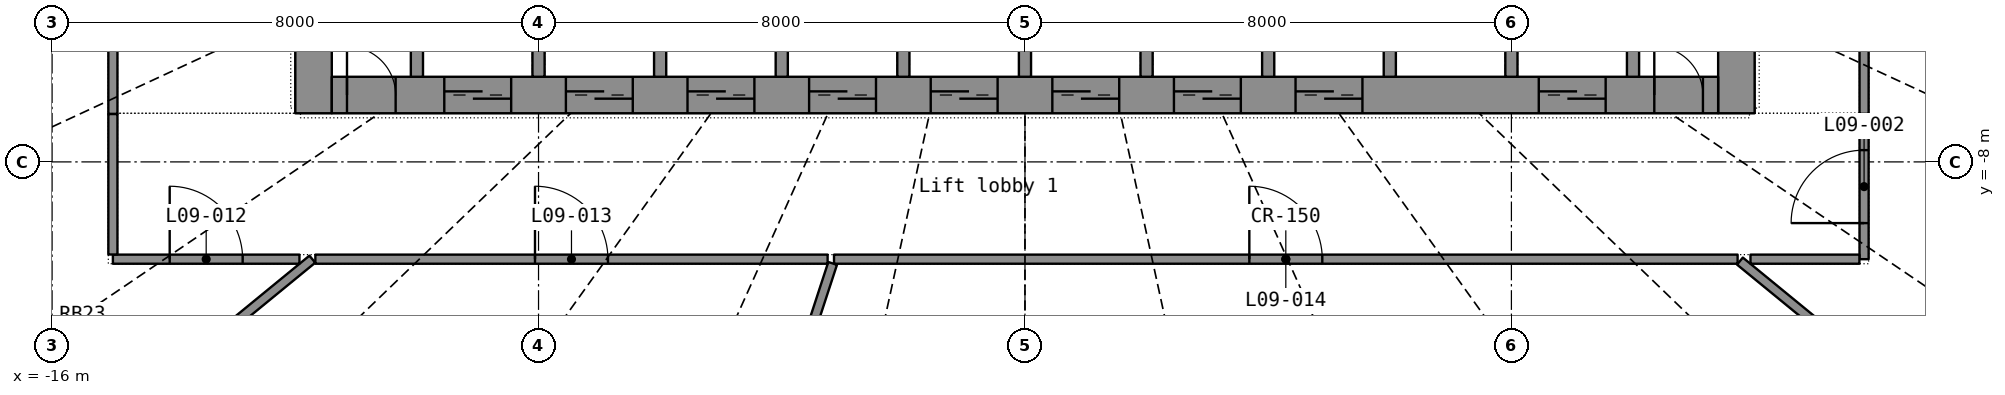
"""IFC4 building model, lengths in metres.
Left out: names, types, materials, properties, quantities, classifications, styles, units other than length and angle.
Written with IfcOpenShell. Run it as: python <this file> out.ifc"""

import sys

from ifc_helpers import new_model, si_unit, direction, frame, frame_2d, origin, place, context, subcontext, project, spatial, rectangle, extrude, element, fill, save


model = new_model("IFC4")
c1 = context("Model", 3, precision=1e-05, world=origin(), true_north=direction((0.0, 1.0)))
c2 = subcontext(c1, "Body", "Model", "MODEL_VIEW")
j1 = project(units=[si_unit("LENGTHUNIT", "METRE"), si_unit("PLANEANGLEUNIT", "RADIAN")], contexts=[c1])
p1 = place(None, origin())
s1 = spatial("IfcSite", under=j1, at=p1, CompositionType="ELEMENT")
p2 = place(p1, origin())
s2 = spatial("IfcBuilding", under=s1, at=p2, CompositionType="ELEMENT")
p3 = place(p2, frame((0.0, 0.0, 44.5)))
s3 = spatial("IfcBuildingStorey", under=s2, at=p3, CompositionType="ELEMENT", Elevation=44.5)
p4 = place(p3, frame((-11.7, -7.2, 0.0), z_axis=(0.0, 0.0, 1.0), x_axis=(0.0, 1.0, 0.0)))
e1 = element("IfcWall", 1, at=p4, inside=s3, PredefinedType="SHEAR", context=c2, shape_type="SweptSolid", body=[
    extrude(rectangle(XDim=14.4, YDim=0.6, at=frame_2d((7.2, 0.0))), origin(), (0.0, 0.0, 1.0), 3.3),
])
p5 = place(p4, frame((6.5, 0.0, 0.0)))
e2 = element("IfcOpeningElement", 2, at=p5, cuts=e1, PredefinedType="OPENING", context=c2, shape_type="SweptSolid", body=[
    extrude(rectangle(XDim=1.4, YDim=2.2, at=frame_2d((0.7, 1.1))), frame((0.0, 0.31, 0.0), z_axis=(0.0, -1.0, 0.0), x_axis=(1.0, 0.0, 0.0)), (0.0, 0.0, 1.0), 0.62),
])
p6 = place(p3, frame((11.7, -7.2, 0.0), z_axis=(0.0, 0.0, 1.0), x_axis=(0.0, 1.0, 0.0)))
e3 = element("IfcWall", 3, at=p6, inside=s3, PredefinedType="SHEAR", context=c2, shape_type="SweptSolid", body=[
    extrude(rectangle(XDim=14.4, YDim=0.6, at=frame_2d((7.2, 0.0))), origin(), (0.0, 0.0, 1.0), 3.3),
])
p7 = place(p6, frame((6.5, 0.0, 0.0)))
e4 = element("IfcOpeningElement", 4, at=p7, cuts=e3, PredefinedType="OPENING", context=c2, shape_type="SweptSolid", body=[
    extrude(rectangle(XDim=1.4, YDim=2.2, at=frame_2d((0.7, 1.1))), frame((0.0, 0.31, 0.0), z_axis=(0.0, -1.0, 0.0), x_axis=(1.0, 0.0, 0.0)), (0.0, 0.0, 1.0), 0.62),
])
p8 = place(p3, frame((-11.4, -6.9, 0.0), z_axis=(0.0, 0.0, 1.0), x_axis=(1.0, 0.0, 0.0)))
e5 = element("IfcWall", 5, at=p8, inside=s3, PredefinedType="SHEAR", context=c2, shape_type="SweptSolid", body=[
    extrude(rectangle(XDim=22.8, YDim=0.6, at=frame_2d((11.4, 0.0))), origin(), (0.0, 0.0, 1.0), 3.3),
])
p9 = place(p8, frame((1.85, 0.0, 0.0)))
e6 = element("IfcOpeningElement", 6, at=p9, cuts=e5, PredefinedType="OPENING", context=c2, shape_type="SweptSolid", body=[
    extrude(rectangle(XDim=1.1, YDim=2.2, at=frame_2d((0.55, 1.1))), frame((0.0, 0.31, 0.0), z_axis=(0.0, -1.0, 0.0), x_axis=(1.0, 0.0, 0.0)), (0.0, 0.0, 1.0), 0.62),
])
p10 = place(p8, frame((3.85, 0.0, 0.0)))
e7 = element("IfcOpeningElement", 7, at=p10, cuts=e5, PredefinedType="OPENING", context=c2, shape_type="SweptSolid", body=[
    extrude(rectangle(XDim=1.1, YDim=2.2, at=frame_2d((0.55, 1.1))), frame((0.0, 0.31, 0.0), z_axis=(0.0, -1.0, 0.0), x_axis=(1.0, 0.0, 0.0)), (0.0, 0.0, 1.0), 0.62),
])
p11 = place(p8, frame((5.85, 0.0, 0.0)))
e8 = element("IfcOpeningElement", 8, at=p11, cuts=e5, PredefinedType="OPENING", context=c2, shape_type="SweptSolid", body=[
    extrude(rectangle(XDim=1.1, YDim=2.2, at=frame_2d((0.55, 1.1))), frame((0.0, 0.31, 0.0), z_axis=(0.0, -1.0, 0.0), x_axis=(1.0, 0.0, 0.0)), (0.0, 0.0, 1.0), 0.62),
])
p12 = place(p8, frame((7.85, 0.0, 0.0)))
e9 = element("IfcOpeningElement", 9, at=p12, cuts=e5, PredefinedType="OPENING", context=c2, shape_type="SweptSolid", body=[
    extrude(rectangle(XDim=1.1, YDim=2.2, at=frame_2d((0.55, 1.1))), frame((0.0, 0.31, 0.0), z_axis=(0.0, -1.0, 0.0), x_axis=(1.0, 0.0, 0.0)), (0.0, 0.0, 1.0), 0.62),
])
p13 = place(p8, frame((9.85, 0.0, 0.0)))
e10 = element("IfcOpeningElement", 10, at=p13, cuts=e5, PredefinedType="OPENING", context=c2, shape_type="SweptSolid", body=[
    extrude(rectangle(XDim=1.1, YDim=2.2, at=frame_2d((0.55, 1.1))), frame((0.0, 0.31, 0.0), z_axis=(0.0, -1.0, 0.0), x_axis=(1.0, 0.0, 0.0)), (0.0, 0.0, 1.0), 0.62),
])
p14 = place(p8, frame((11.85, 0.0, 0.0)))
e11 = element("IfcOpeningElement", 11, at=p14, cuts=e5, PredefinedType="OPENING", context=c2, shape_type="SweptSolid", body=[
    extrude(rectangle(XDim=1.1, YDim=2.2, at=frame_2d((0.55, 1.1))), frame((0.0, 0.31, 0.0), z_axis=(0.0, -1.0, 0.0), x_axis=(1.0, 0.0, 0.0)), (0.0, 0.0, 1.0), 0.62),
])
p15 = place(p8, frame((13.85, 0.0, 0.0)))
e12 = element("IfcOpeningElement", 12, at=p15, cuts=e5, PredefinedType="OPENING", context=c2, shape_type="SweptSolid", body=[
    extrude(rectangle(XDim=1.1, YDim=2.2, at=frame_2d((0.55, 1.1))), frame((0.0, 0.31, 0.0), z_axis=(0.0, -1.0, 0.0), x_axis=(1.0, 0.0, 0.0)), (0.0, 0.0, 1.0), 0.62),
])
p16 = place(p8, frame((15.85, 0.0, 0.0)))
e13 = element("IfcOpeningElement", 13, at=p16, cuts=e5, PredefinedType="OPENING", context=c2, shape_type="SweptSolid", body=[
    extrude(rectangle(XDim=1.1, YDim=2.2, at=frame_2d((0.55, 1.1))), frame((0.0, 0.31, 0.0), z_axis=(0.0, -1.0, 0.0), x_axis=(1.0, 0.0, 0.0)), (0.0, 0.0, 1.0), 0.62),
])
p17 = place(p8, frame((19.85, 0.0, 0.0)))
e14 = element("IfcOpeningElement", 14, at=p17, cuts=e5, PredefinedType="OPENING", context=c2, shape_type="SweptSolid", body=[
    extrude(rectangle(XDim=1.1, YDim=2.2, at=frame_2d((0.55, 1.1))), frame((0.0, 0.31, 0.0), z_axis=(0.0, -1.0, 0.0), x_axis=(1.0, 0.0, 0.0)), (0.0, 0.0, 1.0), 0.62),
])
p18 = place(p8, frame((0.25, 0.0, 0.0)))
e15 = element("IfcOpeningElement", 15, at=p18, cuts=e5, PredefinedType="OPENING", context=c2, shape_type="SweptSolid", body=[
    extrude(rectangle(XDim=0.8, YDim=2.05, at=frame_2d((0.4, 1.025))), frame((0.0, 0.31, 0.0), z_axis=(0.0, -1.0, 0.0), x_axis=(1.0, 0.0, 0.0)), (0.0, 0.0, 1.0), 0.62),
])
p19 = place(p8, frame((21.75, 0.0, 0.0)))
e16 = element("IfcOpeningElement", 16, at=p19, cuts=e5, PredefinedType="OPENING", context=c2, shape_type="SweptSolid", body=[
    extrude(rectangle(XDim=0.8, YDim=2.05, at=frame_2d((0.4, 1.025))), frame((0.0, 0.31, 0.0), z_axis=(0.0, -1.0, 0.0), x_axis=(1.0, 0.0, 0.0)), (0.0, 0.0, 1.0), 0.62),
])
for number, where, z_axis, x_axis in (
    (17, (-10.0, -6.6, 0.0), (0.0, 0.0, 1.0), (0.0, 1.0, 0.0)),
    (18, (-8.0, -6.6, 0.0), (0.0, 0.0, 1.0), (0.0, 1.0, 0.0)),
    (19, (-6.0, -6.6, 0.0), (0.0, 0.0, 1.0), (0.0, 1.0, 0.0)),
    (20, (-4.0, -6.6, 0.0), (0.0, 0.0, 1.0), (0.0, 1.0, 0.0)),
    (21, (-2.0, -6.6, 0.0), (0.0, 0.0, 1.0), (0.0, 1.0, 0.0)),
    (22, (0.0, -6.6, 0.0), (0.0, 0.0, 1.0), (0.0, 1.0, 0.0)),
    (23, (2.0, -6.6, 0.0), (0.0, 0.0, 1.0), (0.0, 1.0, 0.0)),
    (24, (4.0, -6.6, 0.0), (0.0, 0.0, 1.0), (0.0, 1.0, 0.0)),
    (25, (6.0, -6.6, 0.0), (0.0, 0.0, 1.0), (0.0, 1.0, 0.0)),
    (26, (8.0, -6.6, 0.0), (0.0, 0.0, 1.0), (0.0, 1.0, 0.0)),
    (27, (10.0, -6.6, 0.0), (0.0, 0.0, 1.0), (0.0, 1.0, 0.0)),
):
    element("IfcWall", number, at=place(p3, frame(where, z_axis=z_axis, x_axis=x_axis)), inside=s3, PredefinedType="SHEAR", context=c2, shape_type="SweptSolid", body=[
        extrude(rectangle(XDim=2.7, YDim=0.2, at=frame_2d((1.35, 0.0))), origin(), (0.0, 0.0, 1.0), 3.3),
    ])
p20 = place(p3, frame((-3.14, -9.6, 0.0), z_axis=(0.0, 0.0, 1.0), x_axis=(1.0, 0.0, 0.0)))
e28 = element("IfcWall", 28, at=p20, inside=s3, PredefinedType="PARTITIONING", context=c2, shape_type="SweptSolid", body=[
    extrude(rectangle(XDim=14.86, YDim=0.15, at=frame_2d((7.43, 0.0))), origin(), (0.0, 0.0, 1.0), 2.4),
])
p21 = place(p20, frame((6.83, 0.0, 0.0)))
e29 = element("IfcOpeningElement", 29, at=p21, cuts=e28, PredefinedType="OPENING", context=c2, shape_type="SweptSolid", body=[
    extrude(rectangle(XDim=1.2, YDim=2.2, at=frame_2d((0.6, 1.1))), frame((0.0, 0.085, 0.0), z_axis=(0.0, -1.0, 0.0), x_axis=(1.0, 0.0, 0.0)), (0.0, 0.0, 1.0), 0.17),
])
p22 = place(p3, frame((-7.226, -22.091, 0.0), z_axis=(0.0, 0.0, 1.0), x_axis=(0.310909896, 0.950439391, 0.0)))
e30 = element("IfcWall", 30, at=p22, inside=s3, PredefinedType="PARTITIONING", context=c2, shape_type="SweptSolid", body=[
    extrude(rectangle(XDim=13.069, YDim=0.15, at=frame_2d((6.534, 0.0))), origin(), (0.0, 0.0, 1.0), 2.4),
])
p23 = place(p3, frame((-19.75, -16.178, 0.0), z_axis=(0.0, 0.0, 1.0), x_axis=(0.773607181, 0.633665471, 0.0)))
e31 = element("IfcWall", 31, at=p23, inside=s3, PredefinedType="PARTITIONING", context=c2, shape_type="SweptSolid", body=[
    extrude(rectangle(XDim=10.38, YDim=0.15, at=frame_2d((5.19, 0.0))), origin(), (0.0, 0.0, 1.0), 2.4),
])
p24 = place(p3, frame((11.758, -9.631, 0.0), z_axis=(0.0, 0.0, 1.0), x_axis=(0.773600236, -0.63367395, 0.0)))
e32 = element("IfcWall", 32, at=p24, inside=s3, PredefinedType="PARTITIONING", context=c2, shape_type="SweptSolid", body=[
    extrude(rectangle(XDim=10.331, YDim=0.15, at=frame_2d((5.166, 0.0))), origin(), (0.0, 0.0, 1.0), 2.4),
])
p25 = place(p3, frame((-11.67, -9.6, 0.0), z_axis=(0.0, 0.0, 1.0), x_axis=(1.0, 0.0, 0.0)))
e33 = element("IfcWall", 33, at=p25, inside=s3, PredefinedType="PARTITIONING", context=c2, shape_type="SweptSolid", body=[
    extrude(rectangle(XDim=8.425, YDim=0.15, at=frame_2d((4.212, 0.0))), origin(), (0.0, 0.0, 1.0), 2.4),
])
p26 = place(p25, frame((3.612, 0.0, 0.0)))
e34 = element("IfcOpeningElement", 34, at=p26, cuts=e33, PredefinedType="OPENING", context=c2, shape_type="SweptSolid", body=[
    extrude(rectangle(XDim=1.2, YDim=2.2, at=frame_2d((0.6, 1.1))), frame((0.0, 0.085, 0.0), z_axis=(0.0, -1.0, 0.0), x_axis=(1.0, 0.0, 0.0)), (0.0, 0.0, 1.0), 0.17),
])
p27 = place(p3, frame((13.8, -7.212, 0.0), z_axis=(0.0, 0.0, 1.0), x_axis=(0.0, 1.0, 0.0)))
e35 = element("IfcWall", 35, at=p27, inside=s3, PredefinedType="PARTITIONING", context=c2, shape_type="SweptSolid", body=[
    extrude(rectangle(XDim=8.124, YDim=0.15, at=frame_2d((4.062, 0.0))), origin(), (0.0, 0.0, 1.0), 2.4),
])
p28 = place(p27, frame((3.462, 0.0, 0.0)))
e36 = element("IfcOpeningElement", 36, at=p28, cuts=e35, PredefinedType="OPENING", context=c2, shape_type="SweptSolid", body=[
    extrude(rectangle(XDim=1.2, YDim=2.2, at=frame_2d((0.6, 1.1))), frame((0.0, 0.085, 0.0), z_axis=(0.0, -1.0, 0.0), x_axis=(1.0, 0.0, 0.0)), (0.0, 0.0, 1.0), 0.17),
])
p29 = place(p3, frame((-15.0, -3.387, 0.0), z_axis=(0.0, 0.0, 1.0), x_axis=(0.0, -1.0, 0.0)))
e37 = element("IfcWall", 37, at=p29, inside=s3, PredefinedType="PARTITIONING", context=c2, shape_type="SweptSolid", body=[
    extrude(rectangle(XDim=3.824, YDim=0.15, at=frame_2d((1.912, 0.0))), origin(), (0.0, 0.0, 1.0), 2.4),
])
p30 = place(p29, frame((1.312, 0.0, 0.0)))
e38 = element("IfcOpeningElement", 38, at=p30, cuts=e37, PredefinedType="OPENING", context=c2, shape_type="SweptSolid", body=[
    extrude(rectangle(XDim=1.2, YDim=2.2, at=frame_2d((0.6, 1.1))), frame((0.0, 0.085, 0.0), z_axis=(0.0, -1.0, 0.0), x_axis=(1.0, 0.0, 0.0)), (0.0, 0.0, 1.0), 0.17),
])
p31 = place(p3, frame((-15.0, -9.6, 0.0), z_axis=(0.0, 0.0, 1.0), x_axis=(1.0, 0.0, 0.0)))
e39 = element("IfcWall", 39, at=p31, inside=s3, PredefinedType="PARTITIONING", context=c2, shape_type="SweptSolid", body=[
    extrude(rectangle(XDim=3.068, YDim=0.15, at=frame_2d((1.534, 0.0))), origin(), (0.0, 0.0, 1.0), 2.4),
])
p32 = place(p31, frame((0.934, 0.0, 0.0)))
e40 = element("IfcOpeningElement", 40, at=p32, cuts=e39, PredefinedType="OPENING", context=c2, shape_type="SweptSolid", body=[
    extrude(rectangle(XDim=1.2, YDim=2.2, at=frame_2d((0.6, 1.1))), frame((0.0, 0.085, 0.0), z_axis=(0.0, -1.0, 0.0), x_axis=(1.0, 0.0, 0.0)), (0.0, 0.0, 1.0), 0.17),
])
p33 = place(p3, frame((-15.0, -7.213, 0.0), z_axis=(0.0, 0.0, 1.0), x_axis=(0.0, -1.0, 0.0)))
e41 = element("IfcWall", 41, at=p33, inside=s3, PredefinedType="PARTITIONING", context=c2, shape_type="SweptSolid", body=[
    extrude(rectangle(XDim=2.31, YDim=0.15, at=frame_2d((1.155, 0.0))), origin(), (0.0, 0.0, 1.0), 2.4),
])
p34 = place(p3, frame((13.8, -9.6, 0.0), z_axis=(0.0, 0.0, 1.0), x_axis=(0.0, 1.0, 0.0)))
e42 = element("IfcWall", 42, at=p34, inside=s3, PredefinedType="PARTITIONING", context=c2, shape_type="SweptSolid", body=[
    extrude(rectangle(XDim=2.387, YDim=0.15, at=frame_2d((1.194, 0.0))), origin(), (0.0, 0.0, 1.0), 2.4),
])
p35 = place(p34, frame((0.594, 0.0, 0.0)))
e43 = element("IfcOpeningElement", 43, at=p35, cuts=e42, PredefinedType="OPENING", context=c2, shape_type="SweptSolid", body=[
    extrude(rectangle(XDim=1.2, YDim=2.2, at=frame_2d((0.6, 1.1))), frame((0.0, 0.085, 0.0), z_axis=(0.0, -1.0, 0.0), x_axis=(1.0, 0.0, 0.0)), (0.0, 0.0, 1.0), 0.17),
])
p36 = place(p3, frame((11.932, -9.6, 0.0), z_axis=(0.0, 0.0, 1.0), x_axis=(1.0, 0.0, 0.0)))
e44 = element("IfcWall", 44, at=p36, inside=s3, PredefinedType="PARTITIONING", context=c2, shape_type="SweptSolid", body=[
    extrude(rectangle(XDim=1.791, YDim=0.15, at=frame_2d((0.896, 0.0))), origin(), (0.0, 0.0, 1.0), 2.4),
])
p37 = place(p9, origin())
e45 = element("IfcDoor", 45, at=p37, inside=s3, OperationType="DOUBLE_DOOR_SLIDING", PredefinedType="DOOR", context=c2, shape_type="SweptSolid", body=[
    extrude(rectangle(XDim=1.1, YDim=2.2, at=frame_2d((0.55, 1.1))), frame((0.0, 0.025, 0.0), z_axis=(0.0, -1.0, 0.0), x_axis=(1.0, 0.0, 0.0)), (0.0, 0.0, 1.0), 0.05),
])
fill(e6, e45)
p38 = place(p10, origin())
e46 = element("IfcDoor", 46, at=p38, inside=s3, OperationType="DOUBLE_DOOR_SLIDING", PredefinedType="DOOR", context=c2, shape_type="SweptSolid", body=[
    extrude(rectangle(XDim=1.1, YDim=2.2, at=frame_2d((0.55, 1.1))), frame((0.0, 0.025, 0.0), z_axis=(0.0, -1.0, 0.0), x_axis=(1.0, 0.0, 0.0)), (0.0, 0.0, 1.0), 0.05),
])
fill(e7, e46)
p39 = place(p11, origin())
e47 = element("IfcDoor", 47, at=p39, inside=s3, OperationType="DOUBLE_DOOR_SLIDING", PredefinedType="DOOR", context=c2, shape_type="SweptSolid", body=[
    extrude(rectangle(XDim=1.1, YDim=2.2, at=frame_2d((0.55, 1.1))), frame((0.0, 0.025, 0.0), z_axis=(0.0, -1.0, 0.0), x_axis=(1.0, 0.0, 0.0)), (0.0, 0.0, 1.0), 0.05),
])
fill(e8, e47)
p40 = place(p12, origin())
e48 = element("IfcDoor", 48, at=p40, inside=s3, OperationType="DOUBLE_DOOR_SLIDING", PredefinedType="DOOR", context=c2, shape_type="SweptSolid", body=[
    extrude(rectangle(XDim=1.1, YDim=2.2, at=frame_2d((0.55, 1.1))), frame((0.0, 0.025, 0.0), z_axis=(0.0, -1.0, 0.0), x_axis=(1.0, 0.0, 0.0)), (0.0, 0.0, 1.0), 0.05),
])
fill(e9, e48)
p41 = place(p13, origin())
e49 = element("IfcDoor", 49, at=p41, inside=s3, OperationType="DOUBLE_DOOR_SLIDING", PredefinedType="DOOR", context=c2, shape_type="SweptSolid", body=[
    extrude(rectangle(XDim=1.1, YDim=2.2, at=frame_2d((0.55, 1.1))), frame((0.0, 0.025, 0.0), z_axis=(0.0, -1.0, 0.0), x_axis=(1.0, 0.0, 0.0)), (0.0, 0.0, 1.0), 0.05),
])
fill(e10, e49)
p42 = place(p14, origin())
e50 = element("IfcDoor", 50, at=p42, inside=s3, OperationType="DOUBLE_DOOR_SLIDING", PredefinedType="DOOR", context=c2, shape_type="SweptSolid", body=[
    extrude(rectangle(XDim=1.1, YDim=2.2, at=frame_2d((0.55, 1.1))), frame((0.0, 0.025, 0.0), z_axis=(0.0, -1.0, 0.0), x_axis=(1.0, 0.0, 0.0)), (0.0, 0.0, 1.0), 0.05),
])
fill(e11, e50)
p43 = place(p15, origin())
e51 = element("IfcDoor", 51, at=p43, inside=s3, OperationType="DOUBLE_DOOR_SLIDING", PredefinedType="DOOR", context=c2, shape_type="SweptSolid", body=[
    extrude(rectangle(XDim=1.1, YDim=2.2, at=frame_2d((0.55, 1.1))), frame((0.0, 0.025, 0.0), z_axis=(0.0, -1.0, 0.0), x_axis=(1.0, 0.0, 0.0)), (0.0, 0.0, 1.0), 0.05),
])
fill(e12, e51)
p44 = place(p16, origin())
e52 = element("IfcDoor", 52, at=p44, inside=s3, OperationType="DOUBLE_DOOR_SLIDING", PredefinedType="DOOR", context=c2, shape_type="SweptSolid", body=[
    extrude(rectangle(XDim=1.1, YDim=2.2, at=frame_2d((0.55, 1.1))), frame((0.0, 0.025, 0.0), z_axis=(0.0, -1.0, 0.0), x_axis=(1.0, 0.0, 0.0)), (0.0, 0.0, 1.0), 0.05),
])
fill(e13, e52)
p45 = place(p17, origin())
e53 = element("IfcDoor", 53, at=p45, inside=s3, OperationType="DOUBLE_DOOR_SLIDING", PredefinedType="DOOR", context=c2, shape_type="SweptSolid", body=[
    extrude(rectangle(XDim=1.1, YDim=2.2, at=frame_2d((0.55, 1.1))), frame((0.0, 0.025, 0.0), z_axis=(0.0, -1.0, 0.0), x_axis=(1.0, 0.0, 0.0)), (0.0, 0.0, 1.0), 0.05),
])
fill(e14, e53)
p46 = place(p18, origin())
e54 = element("IfcDoor", 54, at=p46, inside=s3, OperationType="SINGLE_SWING_LEFT", PredefinedType="DOOR", context=c2, shape_type="SweptSolid", body=[
    extrude(rectangle(XDim=0.8, YDim=2.05, at=frame_2d((0.4, 1.025))), frame((0.0, 0.025, 0.0), z_axis=(0.0, -1.0, 0.0), x_axis=(1.0, 0.0, 0.0)), (0.0, 0.0, 1.0), 0.05),
])
fill(e15, e54)
p47 = place(p19, origin())
e55 = element("IfcDoor", 55, at=p47, inside=s3, OperationType="SINGLE_SWING_LEFT", PredefinedType="DOOR", context=c2, shape_type="SweptSolid", body=[
    extrude(rectangle(XDim=0.8, YDim=2.05, at=frame_2d((0.4, 1.025))), frame((0.0, 0.025, 0.0), z_axis=(0.0, -1.0, 0.0), x_axis=(1.0, 0.0, 0.0)), (0.0, 0.0, 1.0), 0.05),
])
fill(e16, e55)
p48 = place(p35, origin())
e56 = element("IfcDoor", 56, at=p48, inside=s3, OperationType="DOUBLE_DOOR_SINGLE_SWING", PredefinedType="DOOR", context=c2, shape_type="SweptSolid", body=[
    extrude(rectangle(XDim=1.2, YDim=2.2, at=frame_2d((0.6, 1.1))), frame((0.0, 0.025, 0.0), z_axis=(0.0, -1.0, 0.0), x_axis=(1.0, 0.0, 0.0)), (0.0, 0.0, 1.0), 0.05),
])
fill(e43, e56)
p49 = place(p32, origin())
e57 = element("IfcDoor", 57, at=p49, inside=s3, OperationType="DOUBLE_DOOR_SINGLE_SWING", PredefinedType="DOOR", context=c2, shape_type="SweptSolid", body=[
    extrude(rectangle(XDim=1.2, YDim=2.2, at=frame_2d((0.6, 1.1))), frame((0.0, 0.025, 0.0), z_axis=(0.0, -1.0, 0.0), x_axis=(1.0, 0.0, 0.0)), (0.0, 0.0, 1.0), 0.05),
])
fill(e40, e57)
p50 = place(p26, origin())
e58 = element("IfcDoor", 58, at=p50, inside=s3, OperationType="DOUBLE_DOOR_SINGLE_SWING", PredefinedType="DOOR", context=c2, shape_type="SweptSolid", body=[
    extrude(rectangle(XDim=1.2, YDim=2.2, at=frame_2d((0.6, 1.1))), frame((0.0, 0.025, 0.0), z_axis=(0.0, -1.0, 0.0), x_axis=(1.0, 0.0, 0.0)), (0.0, 0.0, 1.0), 0.05),
])
fill(e34, e58)
p51 = place(p21, origin())
e59 = element("IfcDoor", 59, at=p51, inside=s3, OperationType="DOUBLE_DOOR_SINGLE_SWING", PredefinedType="DOOR", context=c2, shape_type="SweptSolid", body=[
    extrude(rectangle(XDim=1.2, YDim=2.2, at=frame_2d((0.6, 1.1))), frame((0.0, 0.025, 0.0), z_axis=(0.0, -1.0, 0.0), x_axis=(1.0, 0.0, 0.0)), (0.0, 0.0, 1.0), 0.05),
])
fill(e29, e59)
save(model, sys.argv[1])
